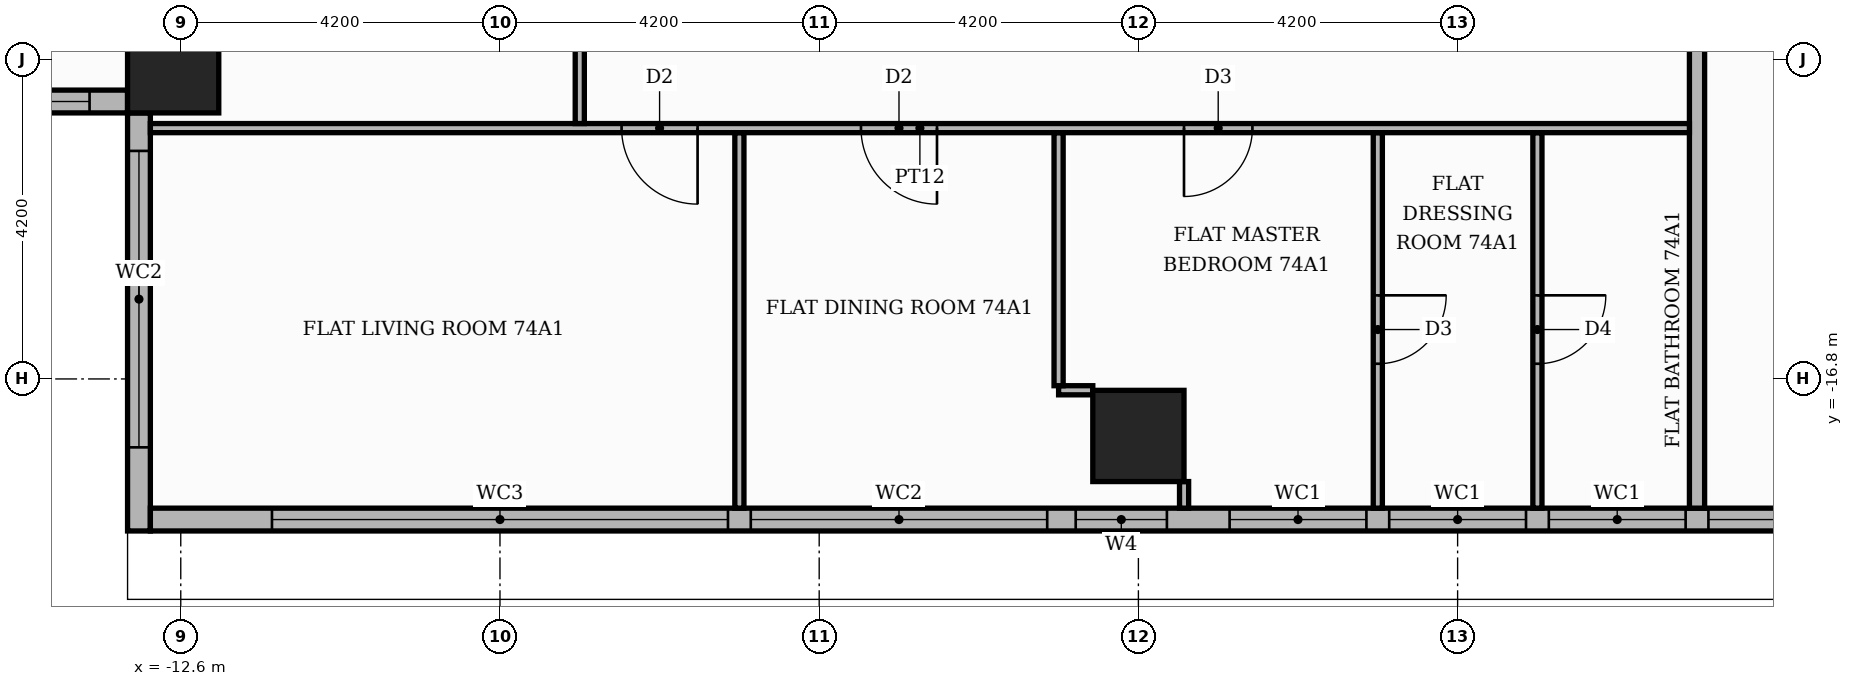
"""IFC4 building model, lengths in metres.
Left out: names, types, materials, properties, quantities, classifications, styles, units other than length and angle.
Written with IfcOpenShell. Run it as: python <this file> out.ifc"""

import sys

from ifc_helpers import new_model, si_unit, direction, frame, frame_2d, origin, origin_2d, place, context, subcontext, project, spatial, rectangle, extrude, element, fill, save


model = new_model("IFC4")
c1 = context("Model", 3, precision=1e-05, world=origin(), true_north=direction((0.0, 1.0)))
c2 = subcontext(c1, "Body", "Model", "MODEL_VIEW")
j1 = project(units=[si_unit("LENGTHUNIT", "METRE"), si_unit("PLANEANGLEUNIT", "RADIAN")], contexts=[c1])
p1 = place(None, origin())
s1 = spatial("IfcSite", under=j1, at=p1, CompositionType="ELEMENT")
p2 = place(p1, origin())
s2 = spatial("IfcBuilding", under=s1, at=p2, CompositionType="ELEMENT")
p3 = place(p2, frame((0.0, 0.0, 308.4)))
s3 = spatial("IfcBuildingStorey", under=s2, at=p3, CompositionType="ELEMENT", Elevation=308.4)
for number, where, z_axis, x_axis in (
    (1, (0.0, -17.55, 0.0), (0.0, 0.0, 1.0), (1.0, 0.0, 0.0)),
    (2, (-12.7, -12.7, 0.0), (0.0, 0.0, 1.0), (1.0, 0.0, 0.0)),
):
    element("IfcColumn", number, at=place(p3, frame(where, z_axis=z_axis, x_axis=x_axis)), inside=s3, PredefinedType="COLUMN", context=c2, shape_type="SweptSolid", body=[
        extrude(rectangle(XDim=1.2, YDim=1.2, at=origin_2d()), origin(), (0.0, 0.0, 1.0), 3.9),
    ])
p4 = place(p3, frame((-18.5, -13.15, 0.0), z_axis=(0.0, 0.0, 1.0), x_axis=(1.0, 0.0, 0.0)))
e3 = element("IfcWall", 3, at=p4, inside=s3, PredefinedType="STANDARD", context=c2, shape_type="SweptSolid", body=[
    extrude(rectangle(XDim=5.2, YDim=0.3, at=frame_2d((2.6, 0.0))), origin(), (0.0, 0.0, 1.0), 3.55),
])
p5 = place(p4, frame((0.8, 0.0, 0.6)))
e4 = element("IfcOpeningElement", 4, at=p5, cuts=e3, PredefinedType="OPENING", context=c2, shape_type="SweptSolid", body=[
    extrude(rectangle(XDim=3.9, YDim=2.4, at=frame_2d((1.95, 1.2))), frame((0.0, 0.16, 0.0), z_axis=(0.0, -1.0, 0.0), x_axis=(1.0, 0.0, 0.0)), (0.0, 0.0, 1.0), 0.32),
])
p6 = place(p3, frame((-13.15, -13.3, 0.0), z_axis=(0.0, 0.0, 1.0), x_axis=(0.0, -1.0, 0.0)))
e5 = element("IfcWall", 5, at=p6, inside=s3, PredefinedType="STANDARD", context=c2, shape_type="SweptSolid", body=[
    extrude(rectangle(XDim=5.5, YDim=0.3, at=frame_2d((2.75, 0.0))), origin(), (0.0, 0.0, 1.0), 3.55),
])
p7 = place(p6, frame((0.5, 0.0, 0.6)))
e6 = element("IfcOpeningElement", 6, at=p7, cuts=e5, PredefinedType="OPENING", context=c2, shape_type="SweptSolid", body=[
    extrude(rectangle(XDim=3.9, YDim=2.4, at=frame_2d((1.95, 1.2))), frame((0.0, 0.16, 0.0), z_axis=(0.0, -1.0, 0.0), x_axis=(1.0, 0.0, 0.0)), (0.0, 0.0, 1.0), 0.32),
])
p8 = place(p3, frame((-13.0, -18.65, 0.0), z_axis=(0.0, 0.0, 1.0), x_axis=(1.0, 0.0, 0.0)))
e7 = element("IfcWall", 7, at=p8, inside=s3, PredefinedType="STANDARD", context=c2, shape_type="SweptSolid", body=[
    extrude(rectangle(XDim=26.3, YDim=0.3, at=frame_2d((13.15, 0.0))), origin(), (0.0, 0.0, 1.0), 3.55),
])
p9 = place(p8, frame((1.6, 0.0, 0.6)))
e8 = element("IfcOpeningElement", 8, at=p9, cuts=e7, PredefinedType="OPENING", context=c2, shape_type="SweptSolid", body=[
    extrude(rectangle(XDim=6.0, YDim=2.4, at=frame_2d((3.0, 1.2))), frame((0.0, 0.16, 0.0), z_axis=(0.0, -1.0, 0.0), x_axis=(1.0, 0.0, 0.0)), (0.0, 0.0, 1.0), 0.32),
])
p10 = place(p8, frame((7.9, 0.0, 0.6)))
e9 = element("IfcOpeningElement", 9, at=p10, cuts=e7, PredefinedType="OPENING", context=c2, shape_type="SweptSolid", body=[
    extrude(rectangle(XDim=3.9, YDim=2.4, at=frame_2d((1.95, 1.2))), frame((0.0, 0.16, 0.0), z_axis=(0.0, -1.0, 0.0), x_axis=(1.0, 0.0, 0.0)), (0.0, 0.0, 1.0), 0.32),
])
p11 = place(p8, frame((14.2, 0.0, 0.6)))
e10 = element("IfcOpeningElement", 10, at=p11, cuts=e7, PredefinedType="OPENING", context=c2, shape_type="SweptSolid", body=[
    extrude(rectangle(XDim=1.8, YDim=2.4, at=frame_2d((0.9, 1.2))), frame((0.0, 0.16, 0.0), z_axis=(0.0, -1.0, 0.0), x_axis=(1.0, 0.0, 0.0)), (0.0, 0.0, 1.0), 0.32),
])
p12 = place(p8, frame((16.3, 0.0, 0.6)))
e11 = element("IfcOpeningElement", 11, at=p12, cuts=e7, PredefinedType="OPENING", context=c2, shape_type="SweptSolid", body=[
    extrude(rectangle(XDim=1.8, YDim=2.4, at=frame_2d((0.9, 1.2))), frame((0.0, 0.16, 0.0), z_axis=(0.0, -1.0, 0.0), x_axis=(1.0, 0.0, 0.0)), (0.0, 0.0, 1.0), 0.32),
])
p13 = place(p8, frame((18.4, 0.0, 0.6)))
e12 = element("IfcOpeningElement", 12, at=p13, cuts=e7, PredefinedType="OPENING", context=c2, shape_type="SweptSolid", body=[
    extrude(rectangle(XDim=1.8, YDim=2.4, at=frame_2d((0.9, 1.2))), frame((0.0, 0.16, 0.0), z_axis=(0.0, -1.0, 0.0), x_axis=(1.0, 0.0, 0.0)), (0.0, 0.0, 1.0), 0.32),
])
p14 = place(p8, frame((20.5, 0.0, 0.6)))
e13 = element("IfcOpeningElement", 13, at=p14, cuts=e7, PredefinedType="OPENING", context=c2, shape_type="SweptSolid", body=[
    extrude(rectangle(XDim=3.9, YDim=2.4, at=frame_2d((1.95, 1.2))), frame((0.0, 0.16, 0.0), z_axis=(0.0, -1.0, 0.0), x_axis=(1.0, 0.0, 0.0)), (0.0, 0.0, 1.0), 0.32),
])
p15 = place(p8, frame((12.175, 0.0, 0.9)))
e14 = element("IfcOpeningElement", 14, at=p15, cuts=e7, PredefinedType="OPENING", context=c2, shape_type="SweptSolid", body=[
    extrude(rectangle(XDim=1.2, YDim=2.1, at=frame_2d((0.6, 1.05))), frame((0.0, 0.16, 0.0), z_axis=(0.0, -1.0, 0.0), x_axis=(1.0, 0.0, 0.0)), (0.0, 0.0, 1.0), 0.32),
])
p16 = place(p3, frame((-5.25, -18.5, 0.0), z_axis=(0.0, 0.0, 1.0), x_axis=(0.0, 1.0, 0.0)))
e15 = element("IfcWall", 15, at=p16, inside=s3, PredefinedType="PARTITIONING", context=c2, shape_type="SweptSolid", body=[
    extrude(rectangle(XDim=4.94, YDim=0.12, at=frame_2d((2.47, 0.0))), origin(), (0.0, 0.0, 1.0), 3.55),
])
p17 = place(p3, frame((0.601, -18.5, 0.0), z_axis=(0.0, 0.0, 1.0), x_axis=(0.0, 1.0, 0.0)))
e16 = element("IfcWall", 16, at=p17, inside=s3, PredefinedType="PARTITIONING", context=c2, shape_type="SweptSolid", body=[
    extrude(rectangle(XDim=0.35, YDim=0.12, at=frame_2d((0.175, 0.0))), origin(), (0.0, 0.0, 1.0), 3.55),
])
p18 = place(p3, frame((3.15, -18.5, 0.0), z_axis=(0.0, 0.0, 1.0), x_axis=(0.0, 1.0, 0.0)))
e17 = element("IfcWall", 17, at=p18, inside=s3, PredefinedType="PARTITIONING", context=c2, shape_type="SweptSolid", body=[
    extrude(rectangle(XDim=4.94, YDim=0.12, at=frame_2d((2.47, 0.0))), origin(), (0.0, 0.0, 1.0), 3.55),
])
p19 = place(p18, frame((1.9, 0.0, 0.0)))
e18 = element("IfcOpeningElement", 18, at=p19, cuts=e17, PredefinedType="OPENING", context=c2, shape_type="SweptSolid", body=[
    extrude(rectangle(XDim=0.9, YDim=2.1, at=frame_2d((0.45, 1.05))), frame((0.0, 0.07, 0.0), z_axis=(0.0, -1.0, 0.0), x_axis=(1.0, 0.0, 0.0)), (0.0, 0.0, 1.0), 0.14),
])
p20 = place(p3, frame((5.25, -18.5, 0.0), z_axis=(0.0, 0.0, 1.0), x_axis=(0.0, 1.0, 0.0)))
e19 = element("IfcWall", 19, at=p20, inside=s3, PredefinedType="PARTITIONING", context=c2, shape_type="SweptSolid", body=[
    extrude(rectangle(XDim=4.94, YDim=0.12, at=frame_2d((2.47, 0.0))), origin(), (0.0, 0.0, 1.0), 3.55),
])
p21 = place(p20, frame((1.9, 0.0, 0.0)))
e20 = element("IfcOpeningElement", 20, at=p21, cuts=e19, PredefinedType="OPENING", context=c2, shape_type="SweptSolid", body=[
    extrude(rectangle(XDim=0.9, YDim=2.1, at=frame_2d((0.45, 1.05))), frame((0.0, 0.07, 0.0), z_axis=(0.0, -1.0, 0.0), x_axis=(1.0, 0.0, 0.0)), (0.0, 0.0, 1.0), 0.14),
])
p22 = place(p3, frame((7.35, -18.5, 0.0), z_axis=(0.0, 0.0, 1.0), x_axis=(0.0, 1.0, 0.0)))
e21 = element("IfcWall", 21, at=p22, inside=s3, PredefinedType="PARTITIONING", context=c2, shape_type="SweptSolid", body=[
    extrude(rectangle(XDim=11.05, YDim=0.2, at=frame_2d((5.525, 0.0))), origin(), (0.0, 0.0, 1.0), 3.55),
])
p23 = place(p3, frame((-1.05, -16.949, 0.0), z_axis=(0.0, 0.0, 1.0), x_axis=(1.0, 0.0, 0.0)))
e22 = element("IfcWall", 22, at=p23, inside=s3, PredefinedType="PARTITIONING", context=c2, shape_type="SweptSolid", body=[
    extrude(rectangle(XDim=0.45, YDim=0.12, at=frame_2d((0.225, 0.0))), origin(), (0.0, 0.0, 1.0), 3.55),
])
p24 = place(p3, frame((-1.05, -16.889, 0.0), z_axis=(0.0, 0.0, 1.0), x_axis=(0.0, 1.0, 0.0)))
e23 = element("IfcWall", 23, at=p24, inside=s3, PredefinedType="PARTITIONING", context=c2, shape_type="SweptSolid", body=[
    extrude(rectangle(XDim=3.329, YDim=0.12, at=frame_2d((1.665, 0.0))), origin(), (0.0, 0.0, 1.0), 3.55),
])
p25 = place(p3, frame((-13.0, -13.5, 0.0), z_axis=(0.0, 0.0, 1.0), x_axis=(1.0, 0.0, 0.0)))
e24 = element("IfcWall", 24, at=p25, inside=s3, PredefinedType="PARTITIONING", context=c2, shape_type="SweptSolid", body=[
    extrude(rectangle(XDim=20.25, YDim=0.12, at=frame_2d((10.125, 0.0))), origin(), (0.0, 0.0, 1.0), 3.55),
])
p26 = place(p25, frame((6.2, 0.0, 0.0)))
e25 = element("IfcOpeningElement", 25, at=p26, cuts=e24, PredefinedType="OPENING", context=c2, shape_type="SweptSolid", body=[
    extrude(rectangle(XDim=1.0, YDim=2.1, at=frame_2d((0.5, 1.05))), frame((0.0, 0.07, 0.0), z_axis=(0.0, -1.0, 0.0), x_axis=(1.0, 0.0, 0.0)), (0.0, 0.0, 1.0), 0.14),
])
p27 = place(p25, frame((9.35, 0.0, 0.0)))
e26 = element("IfcOpeningElement", 26, at=p27, cuts=e24, PredefinedType="OPENING", context=c2, shape_type="SweptSolid", body=[
    extrude(rectangle(XDim=1.0, YDim=2.1, at=frame_2d((0.5, 1.05))), frame((0.0, 0.07, 0.0), z_axis=(0.0, -1.0, 0.0), x_axis=(1.0, 0.0, 0.0)), (0.0, 0.0, 1.0), 0.14),
])
p28 = place(p25, frame((13.6, 0.0, 0.0)))
e27 = element("IfcOpeningElement", 27, at=p28, cuts=e24, PredefinedType="OPENING", context=c2, shape_type="SweptSolid", body=[
    extrude(rectangle(XDim=0.9, YDim=2.1, at=frame_2d((0.45, 1.05))), frame((0.0, 0.07, 0.0), z_axis=(0.0, -1.0, 0.0), x_axis=(1.0, 0.0, 0.0)), (0.0, 0.0, 1.0), 0.14),
])
p29 = place(p3, frame((-7.35, -13.44, 0.0), z_axis=(0.0, 0.0, 1.0), x_axis=(0.0, 1.0, 0.0)))
e28 = element("IfcWall", 28, at=p29, inside=s3, PredefinedType="PARTITIONING", context=c2, shape_type="SweptSolid", body=[
    extrude(rectangle(XDim=5.99, YDim=0.12, at=frame_2d((2.995, 0.0))), origin(), (0.0, 0.0, 1.0), 3.55),
])
p30 = place(p29, frame((2.565, 0.0, 0.0)))
e29 = element("IfcOpeningElement", 29, at=p30, cuts=e28, PredefinedType="OPENING", context=c2, shape_type="SweptSolid", body=[
    extrude(rectangle(XDim=0.9, YDim=2.1, at=frame_2d((0.45, 1.05))), frame((0.0, 0.07, 0.0), z_axis=(0.0, -1.0, 0.0), x_axis=(1.0, 0.0, 0.0)), (0.0, 0.0, 1.0), 0.14),
])
p31 = place(p5, origin())
e30 = element("IfcWindow", 30, at=p31, inside=s3, PartitioningType="SINGLE_PANEL", PredefinedType="WINDOW", context=c2, shape_type="SweptSolid", body=[
    extrude(rectangle(XDim=3.9, YDim=2.4, at=frame_2d((1.95, 1.2))), frame((0.0, 0.03, 0.0), z_axis=(0.0, -1.0, 0.0), x_axis=(1.0, 0.0, 0.0)), (0.0, 0.0, 1.0), 0.06),
])
fill(e4, e30)
p32 = place(p7, origin())
e31 = element("IfcWindow", 31, at=p32, inside=s3, PartitioningType="SINGLE_PANEL", PredefinedType="WINDOW", context=c2, shape_type="SweptSolid", body=[
    extrude(rectangle(XDim=3.9, YDim=2.4, at=frame_2d((1.95, 1.2))), frame((0.0, 0.03, 0.0), z_axis=(0.0, -1.0, 0.0), x_axis=(1.0, 0.0, 0.0)), (0.0, 0.0, 1.0), 0.06),
])
fill(e6, e31)
p33 = place(p9, origin())
e32 = element("IfcWindow", 32, at=p33, inside=s3, PartitioningType="SINGLE_PANEL", PredefinedType="WINDOW", context=c2, shape_type="SweptSolid", body=[
    extrude(rectangle(XDim=6.0, YDim=2.4, at=frame_2d((3.0, 1.2))), frame((0.0, 0.03, 0.0), z_axis=(0.0, -1.0, 0.0), x_axis=(1.0, 0.0, 0.0)), (0.0, 0.0, 1.0), 0.06),
])
fill(e8, e32)
p34 = place(p10, origin())
e33 = element("IfcWindow", 33, at=p34, inside=s3, PartitioningType="SINGLE_PANEL", PredefinedType="WINDOW", context=c2, shape_type="SweptSolid", body=[
    extrude(rectangle(XDim=3.9, YDim=2.4, at=frame_2d((1.95, 1.2))), frame((0.0, 0.03, 0.0), z_axis=(0.0, -1.0, 0.0), x_axis=(1.0, 0.0, 0.0)), (0.0, 0.0, 1.0), 0.06),
])
fill(e9, e33)
p35 = place(p11, origin())
e34 = element("IfcWindow", 34, at=p35, inside=s3, PartitioningType="SINGLE_PANEL", PredefinedType="WINDOW", context=c2, shape_type="SweptSolid", body=[
    extrude(rectangle(XDim=1.8, YDim=2.4, at=frame_2d((0.9, 1.2))), frame((0.0, 0.03, 0.0), z_axis=(0.0, -1.0, 0.0), x_axis=(1.0, 0.0, 0.0)), (0.0, 0.0, 1.0), 0.06),
])
fill(e10, e34)
p36 = place(p12, origin())
e35 = element("IfcWindow", 35, at=p36, inside=s3, PartitioningType="SINGLE_PANEL", PredefinedType="WINDOW", context=c2, shape_type="SweptSolid", body=[
    extrude(rectangle(XDim=1.8, YDim=2.4, at=frame_2d((0.9, 1.2))), frame((0.0, 0.03, 0.0), z_axis=(0.0, -1.0, 0.0), x_axis=(1.0, 0.0, 0.0)), (0.0, 0.0, 1.0), 0.06),
])
fill(e11, e35)
p37 = place(p13, origin())
e36 = element("IfcWindow", 36, at=p37, inside=s3, PartitioningType="SINGLE_PANEL", PredefinedType="WINDOW", context=c2, shape_type="SweptSolid", body=[
    extrude(rectangle(XDim=1.8, YDim=2.4, at=frame_2d((0.9, 1.2))), frame((0.0, 0.03, 0.0), z_axis=(0.0, -1.0, 0.0), x_axis=(1.0, 0.0, 0.0)), (0.0, 0.0, 1.0), 0.06),
])
fill(e12, e36)
p38 = place(p14, origin())
e37 = element("IfcWindow", 37, at=p38, inside=s3, PartitioningType="SINGLE_PANEL", PredefinedType="WINDOW", context=c2, shape_type="SweptSolid", body=[
    extrude(rectangle(XDim=3.9, YDim=2.4, at=frame_2d((1.95, 1.2))), frame((0.0, 0.03, 0.0), z_axis=(0.0, -1.0, 0.0), x_axis=(1.0, 0.0, 0.0)), (0.0, 0.0, 1.0), 0.06),
])
fill(e13, e37)
p39 = place(p15, origin())
e38 = element("IfcWindow", 38, at=p39, inside=s3, PartitioningType="SINGLE_PANEL", PredefinedType="WINDOW", context=c2, shape_type="SweptSolid", body=[
    extrude(rectangle(XDim=1.2, YDim=2.1, at=frame_2d((0.6, 1.05))), frame((0.0, 0.03, 0.0), z_axis=(0.0, -1.0, 0.0), x_axis=(1.0, 0.0, 0.0)), (0.0, 0.0, 1.0), 0.06),
])
fill(e14, e38)
p40 = place(p26, frame((1.0, 0.0, 0.0), z_axis=(0.0, 0.0, 1.0), x_axis=(-1.0, 0.0, 0.0)))
e39 = element("IfcDoor", 39, at=p40, inside=s3, OperationType="SINGLE_SWING_RIGHT", PredefinedType="DOOR", context=c2, shape_type="SweptSolid", body=[
    extrude(rectangle(XDim=1.0, YDim=2.1, at=frame_2d((0.5, 1.05))), frame((0.0, 0.025, 0.0), z_axis=(0.0, -1.0, 0.0), x_axis=(1.0, 0.0, 0.0)), (0.0, 0.0, 1.0), 0.05),
])
fill(e25, e39)
p41 = place(p27, frame((1.0, 0.0, 0.0), z_axis=(0.0, 0.0, 1.0), x_axis=(-1.0, 0.0, 0.0)))
e40 = element("IfcDoor", 40, at=p41, inside=s3, OperationType="SINGLE_SWING_RIGHT", PredefinedType="DOOR", context=c2, shape_type="SweptSolid", body=[
    extrude(rectangle(XDim=1.0, YDim=2.1, at=frame_2d((0.5, 1.05))), frame((0.0, 0.025, 0.0), z_axis=(0.0, -1.0, 0.0), x_axis=(1.0, 0.0, 0.0)), (0.0, 0.0, 1.0), 0.05),
])
fill(e26, e40)
p42 = place(p28, frame((0.9, 0.0, 0.0), z_axis=(0.0, 0.0, 1.0), x_axis=(-1.0, 0.0, 0.0)))
e41 = element("IfcDoor", 41, at=p42, inside=s3, OperationType="SINGLE_SWING_LEFT", PredefinedType="DOOR", context=c2, shape_type="SweptSolid", body=[
    extrude(rectangle(XDim=0.9, YDim=2.1, at=frame_2d((0.45, 1.05))), frame((0.0, 0.025, 0.0), z_axis=(0.0, -1.0, 0.0), x_axis=(1.0, 0.0, 0.0)), (0.0, 0.0, 1.0), 0.05),
])
fill(e27, e41)
p43 = place(p19, frame((0.9, 0.0, 0.0), z_axis=(0.0, 0.0, 1.0), x_axis=(-1.0, 0.0, 0.0)))
e42 = element("IfcDoor", 42, at=p43, inside=s3, OperationType="SINGLE_SWING_RIGHT", PredefinedType="DOOR", context=c2, shape_type="SweptSolid", body=[
    extrude(rectangle(XDim=0.9, YDim=2.1, at=frame_2d((0.45, 1.05))), frame((0.0, 0.025, 0.0), z_axis=(0.0, -1.0, 0.0), x_axis=(1.0, 0.0, 0.0)), (0.0, 0.0, 1.0), 0.05),
])
fill(e18, e42)
p44 = place(p21, frame((0.9, 0.0, 0.0), z_axis=(0.0, 0.0, 1.0), x_axis=(-1.0, 0.0, 0.0)))
e43 = element("IfcDoor", 43, at=p44, inside=s3, OperationType="SINGLE_SWING_RIGHT", PredefinedType="DOOR", context=c2, shape_type="SweptSolid", body=[
    extrude(rectangle(XDim=0.9, YDim=2.1, at=frame_2d((0.45, 1.05))), frame((0.0, 0.025, 0.0), z_axis=(0.0, -1.0, 0.0), x_axis=(1.0, 0.0, 0.0)), (0.0, 0.0, 1.0), 0.05),
])
fill(e20, e43)
save(model, sys.argv[1])
